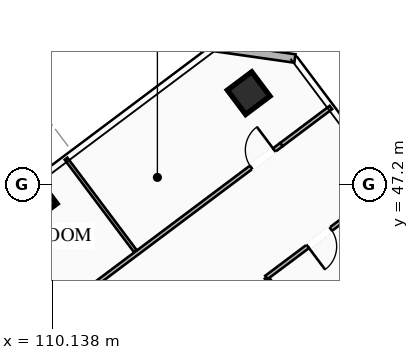
"""IFC4 building model, lengths in metres.
Left out: names, types, materials, properties, quantities, classifications, styles, units other than length and angle.
Written with IfcOpenShell. Run it as: python <this file> out.ifc"""

import sys

from ifc_helpers import new_model, si_unit, direction, frame, frame_2d, origin, origin_2d, place, context, subcontext, project, spatial, rectangle, hollow_rectangle, extrude, element, fill, save


model = new_model("IFC4")
c1 = context("Model", 3, precision=1e-05, world=origin(), true_north=direction((0.0, 1.0)))
c2 = subcontext(c1, "Body", "Model", "MODEL_VIEW")
j1 = project(units=[si_unit("LENGTHUNIT", "METRE"), si_unit("PLANEANGLEUNIT", "RADIAN")], contexts=[c1])
p1 = place(None, origin())
s1 = spatial("IfcSite", under=j1, at=p1, CompositionType="ELEMENT")
p2 = place(p1, origin())
s2 = spatial("IfcBuilding", under=s1, at=p2, CompositionType="ELEMENT")
p3 = place(p2, frame((0.0, 0.0, 243.25)))
s3 = spatial("IfcBuildingStorey", under=s2, at=p3, CompositionType="ELEMENT", Elevation=243.25)
p4 = place(p3, frame((116.6, 50.2, 0.0), z_axis=(0.0, 0.0, 1.0), x_axis=(0.799999996291, 0.600000004945, 0.0)))
e1 = element("IfcColumn", 1, at=p4, inside=s3, PredefinedType="COLUMN", context=c2, shape_type="SweptSolid", body=[
    extrude(hollow_rectangle(XDim=1.0, YDim=1.0, WallThickness=0.04, at=origin_2d()), origin(), (0.0, 0.0, 1.0), 3.25),
])
p5 = place(p3, frame((109.77, 46.64, 0.0), z_axis=(0.0, 0.0, 1.0), x_axis=(0.799999996291, 0.600000004945, 0.0)))
e2 = element("IfcColumn", 2, at=p5, inside=s3, PredefinedType="COLUMN", context=c2, shape_type="SweptSolid", body=[
    extrude(hollow_rectangle(XDim=0.75, YDim=0.75, WallThickness=0.032, at=origin_2d()), origin(), (0.0, 0.0, 1.0), 3.25),
])
p6 = place(p3, frame((115.46, 51.72, 0.0), z_axis=(0.0, 0.0, 1.0), x_axis=(0.989956760759, -0.141370477216, 0.0)))
e3 = element("IfcWall", 3, at=p6, inside=s3, PredefinedType="SOLIDWALL", context=c2, shape_type="SweptSolid", body=[
    extrude(rectangle(XDim=2.687, YDim=0.28, at=frame_2d((1.344, 0.0))), origin(), (0.0, 0.0, 1.0), 3.25),
])
p7 = place(p3, frame((119.824, 40.618, 0.0), z_axis=(0.0, 0.0, 1.0), x_axis=(-0.599982243973, 0.800013316712, 0.0)))
e4 = element("IfcWall", 4, at=p7, inside=s3, PredefinedType="PARTITIONING", context=c2, shape_type="SweptSolid", body=[
    extrude(rectangle(XDim=4.4, YDim=0.135, at=frame_2d((2.2, 0.0))), origin(), (0.0, 0.0, 1.0), 2.393),
])
p8 = place(p3, frame((99.736, 35.052, 0.0), z_axis=(0.0, 0.0, 1.0), x_axis=(0.799997387685, 0.600003483071, 0.0)))
e5 = element("IfcWall", 5, at=p8, inside=s3, PredefinedType="PARTITIONING", context=c2, shape_type="SweptSolid", body=[
    extrude(rectangle(XDim=22.43, YDim=0.135, at=frame_2d((11.215, 0.0))), origin(), (0.0, 0.0, 1.0), 2.393),
])
p9 = place(p8, frame((0.3, 0.0, 0.0)))
e6 = element("IfcOpeningElement", 6, at=p9, cuts=e5, PredefinedType="OPENING", context=c2, shape_type="SweptSolid", body=[
    extrude(rectangle(XDim=0.95, YDim=2.05, at=frame_2d((0.475, 1.025))), frame((0.0, 0.077, 0.0), z_axis=(0.0, -1.0, 0.0), x_axis=(1.0, 0.0, 0.0)), (0.0, 0.0, 1.0), 0.155),
])
p10 = place(p8, frame((9.313, 0.0, 0.0)))
e7 = element("IfcOpeningElement", 7, at=p10, cuts=e5, PredefinedType="OPENING", context=c2, shape_type="SweptSolid", body=[
    extrude(rectangle(XDim=0.95, YDim=2.05, at=frame_2d((0.475, 1.025))), frame((0.0, 0.077, 0.0), z_axis=(0.0, -1.0, 0.0), x_axis=(1.0, 0.0, 0.0)), (0.0, 0.0, 1.0), 0.155),
])
p11 = place(p8, frame((21.18, 0.0, 0.0)))
e8 = element("IfcOpeningElement", 8, at=p11, cuts=e5, PredefinedType="OPENING", context=c2, shape_type="SweptSolid", body=[
    extrude(rectangle(XDim=0.95, YDim=2.05, at=frame_2d((0.475, 1.025))), frame((0.0, 0.077, 0.0), z_axis=(0.0, -1.0, 0.0), x_axis=(1.0, 0.0, 0.0)), (0.0, 0.0, 1.0), 0.155),
])
p12 = place(p3, frame((117.68, 48.51, 0.0), z_axis=(0.0, 0.0, 1.0), x_axis=(0.8, 0.6, 0.0)))
e9 = element("IfcWall", 9, at=p12, inside=s3, PredefinedType="PARTITIONING", context=c2, shape_type="SweptSolid", body=[
    extrude(rectangle(XDim=2.03, YDim=0.135, at=frame_2d((1.015, 0.0))), origin(), (0.0, 0.0, 1.0), 2.393),
])
p13 = place(p3, frame((112.872, 45.004, 0.0), z_axis=(0.0, 0.0, 1.0), x_axis=(-0.6, 0.8, 0.0)))
e10 = element("IfcWall", 10, at=p13, inside=s3, PredefinedType="PARTITIONING", context=c2, shape_type="SweptSolid", body=[
    extrude(rectangle(XDim=3.8, YDim=0.11, at=frame_2d((1.9, 0.0))), origin(), (0.0, 0.0, 1.0), 2.393),
])
p14 = place(p3, frame((121.224, 47.168, 0.0), z_axis=(0.0, 0.0, 1.0), x_axis=(-0.8, -0.6, 0.0)))
e11 = element("IfcWall", 11, at=p14, inside=s3, PredefinedType="PARTITIONING", context=c2, shape_type="SweptSolid", body=[
    extrude(rectangle(XDim=5.05, YDim=0.135, at=frame_2d((2.525, 0.0))), origin(), (0.0, 0.0, 1.0), 2.393),
])
p15 = place(p14, frame((2.4, 0.0, 0.0)))
e12 = element("IfcOpeningElement", 12, at=p15, cuts=e11, PredefinedType="OPENING", context=c2, shape_type="SweptSolid", body=[
    extrude(rectangle(XDim=0.95, YDim=2.05, at=frame_2d((0.475, 1.025))), frame((0.0, 0.077, 0.0), z_axis=(0.0, -1.0, 0.0), x_axis=(1.0, 0.0, 0.0)), (0.0, 0.0, 1.0), 0.155),
])
p16 = place(p11, origin())
e13 = element("IfcDoor", 13, at=p16, inside=s3, OperationType="SINGLE_SWING_RIGHT", PredefinedType="DOOR", context=c2, shape_type="SweptSolid", body=[
    extrude(rectangle(XDim=0.95, YDim=2.05, at=frame_2d((0.475, 1.025))), frame((0.0, 0.025, 0.0), z_axis=(0.0, -1.0, 0.0), x_axis=(1.0, 0.0, 0.0)), (0.0, 0.0, 1.0), 0.05),
])
fill(e8, e13)
p17 = place(p15, origin())
e14 = element("IfcDoor", 14, at=p17, inside=s3, OperationType="SINGLE_SWING_RIGHT", PredefinedType="DOOR", context=c2, shape_type="SweptSolid", body=[
    extrude(rectangle(XDim=0.95, YDim=2.05, at=frame_2d((0.475, 1.025))), frame((0.0, 0.025, 0.0), z_axis=(0.0, -1.0, 0.0), x_axis=(1.0, 0.0, 0.0)), (0.0, 0.0, 1.0), 0.05),
])
fill(e12, e14)
save(model, sys.argv[1])
